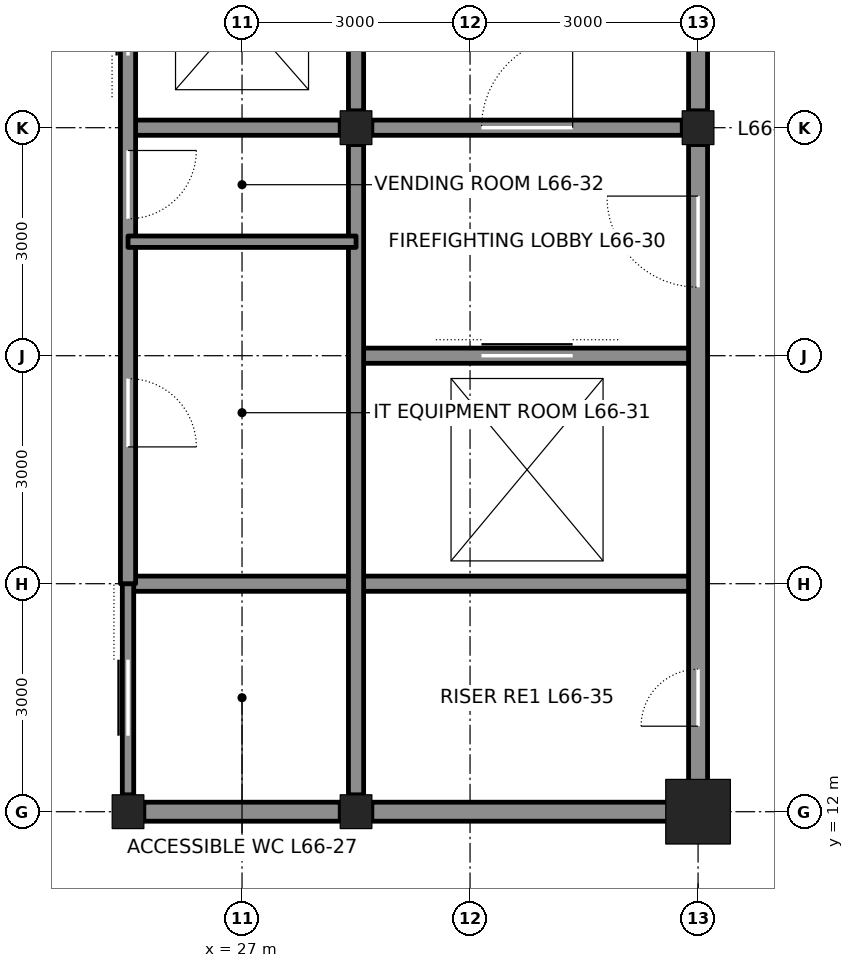
"""IFC4 building model, lengths in metres.
Left out: names, types, materials, properties, quantities, classifications, styles, units other than length and angle.
Written with IfcOpenShell. Run it as: python <this file> out.ifc"""

import sys

from ifc_helpers import new_model, si_unit, direction, frame, frame_2d, origin, origin_2d, place, context, subcontext, project, spatial, rectangle, hollow_rectangle, i_section, extrude, element, fill, save


model = new_model("IFC4")
c1 = context("Model", 3, precision=1e-05, world=origin(), true_north=direction((0.0, 1.0)))
c2 = subcontext(c1, "Body", "Model", "MODEL_VIEW")
j1 = project(units=[si_unit("LENGTHUNIT", "METRE"), si_unit("PLANEANGLEUNIT", "RADIAN")], contexts=[c1])
p1 = place(None, origin())
s1 = spatial("IfcSite", under=j1, at=p1, CompositionType="ELEMENT")
p2 = place(p1, origin())
s2 = spatial("IfcBuilding", under=s1, at=p2, CompositionType="ELEMENT")
p3 = place(p2, frame((0.0, 0.0, 295.8)))
s3 = spatial("IfcBuildingStorey", under=s2, at=p3, CompositionType="ELEMENT", Elevation=295.8)
for number, where, z_axis, x_axis in (
    (1, (25.5, 12.0, 0.0), (0.0, 0.0, 1.0), (1.0, 0.0, 0.0)),
    (2, (28.5, 12.0, 0.0), (0.0, 0.0, 1.0), (1.0, 0.0, 0.0)),
):
    element("IfcColumn", number, at=place(p3, frame(where, z_axis=z_axis, x_axis=x_axis)), inside=s3, PredefinedType="COLUMN", context=c2, shape_type="SweptSolid", body=[
        extrude(i_section(OverallWidth=0.417, OverallDepth=0.445, WebThickness=0.039, FlangeThickness=0.063, at=origin_2d()), origin(), (0.0, 0.0, 1.0), 4.2),
    ])
p4 = place(p3, frame((33.0, 12.0, 0.0), z_axis=(0.0, 0.0, 1.0), x_axis=(1.0, 0.0, 0.0)))
e3 = element("IfcColumn", 3, at=p4, inside=s3, PredefinedType="COLUMN", context=c2, shape_type="SweptSolid", body=[
    extrude(hollow_rectangle(XDim=0.85, YDim=0.85, WallThickness=0.085, at=origin_2d()), origin(), (0.0, 0.0, 1.0), 4.2),
])
for number, where, z_axis, x_axis in (
    (4, (33.0, 21.0, 0.0), (0.0, 0.0, 1.0), (1.0, 0.0, 0.0)),
    (5, (28.5, 21.0, 0.0), (0.0, 0.0, 1.0), (1.0, 0.0, 0.0)),
):
    element("IfcColumn", number, at=place(p3, frame(where, z_axis=z_axis, x_axis=x_axis)), inside=s3, PredefinedType="COLUMN", context=c2, shape_type="SweptSolid", body=[
        extrude(i_section(OverallWidth=0.417, OverallDepth=0.445, WebThickness=0.039, FlangeThickness=0.063, at=origin_2d()), origin(), (0.0, 0.0, 1.0), 4.2),
    ])
p5 = place(p3, frame((25.708, 12.0, 0.0), z_axis=(0.0, 0.0, 1.0), x_axis=(1.0, 0.0, 0.0)))
e6 = element("IfcWall", 6, at=p5, inside=s3, PredefinedType="SOLIDWALL", context=c2, shape_type="SweptSolid", body=[
    extrude(rectangle(XDim=2.583, YDim=0.25, at=frame_2d((1.292, 0.0))), origin(), (0.0, 0.0, 1.0), 3.181),
])
p6 = place(p3, frame((28.708, 12.0, 0.0), z_axis=(0.0, 0.0, 1.0), x_axis=(1.0, 0.0, 0.0)))
e7 = element("IfcWall", 7, at=p6, inside=s3, PredefinedType="SOLIDWALL", context=c2, shape_type="SweptSolid", body=[
    extrude(rectangle(XDim=4.042, YDim=0.25, at=frame_2d((2.021, 0.0))), origin(), (0.0, 0.0, 1.0), 3.181),
])
p7 = place(p3, frame((25.5, 15.0, 0.0), z_axis=(0.0, 0.0, 1.0), x_axis=(1.0, 0.0, 0.0)))
e8 = element("IfcWall", 8, at=p7, inside=s3, PredefinedType="SOLIDWALL", context=c2, shape_type="SweptSolid", body=[
    extrude(rectangle(XDim=7.5, YDim=0.2, at=frame_2d((3.75, 0.0))), origin(), (0.0, 0.0, 1.0), 4.04),
])
p8 = place(p3, frame((28.5, 18.0, 0.0), z_axis=(0.0, 0.0, 1.0), x_axis=(1.0, 0.0, 0.0)))
e9 = element("IfcWall", 9, at=p8, inside=s3, PredefinedType="SOLIDWALL", context=c2, shape_type="SweptSolid", body=[
    extrude(rectangle(XDim=4.5, YDim=0.2, at=frame_2d((2.25, 0.0))), origin(), (0.0, 0.0, 1.0), 4.04),
])
p9 = place(p8, frame((1.65, 0.0, 0.0)))
e10 = element("IfcOpeningElement", 10, at=p9, cuts=e9, PredefinedType="OPENING", context=c2, shape_type="SweptSolid", body=[
    extrude(rectangle(XDim=1.2, YDim=2.1, at=frame_2d((0.6, 1.05))), frame((0.0, 0.11, 0.0), z_axis=(0.0, -1.0, 0.0), x_axis=(1.0, 0.0, 0.0)), (0.0, 0.0, 1.0), 0.22),
])
p10 = place(p3, frame((25.5, 21.0, 0.0), z_axis=(0.0, 0.0, 1.0), x_axis=(1.0, 0.0, 0.0)))
e11 = element("IfcWall", 11, at=p10, inside=s3, PredefinedType="SOLIDWALL", context=c2, shape_type="SweptSolid", body=[
    extrude(rectangle(XDim=2.792, YDim=0.2, at=frame_2d((1.396, 0.0))), origin(), (0.0, 0.0, 1.0), 3.09),
])
p11 = place(p3, frame((28.708, 21.0, 0.0), z_axis=(0.0, 0.0, 1.0), x_axis=(1.0, 0.0, 0.0)))
e12 = element("IfcWall", 12, at=p11, inside=s3, PredefinedType="SOLIDWALL", context=c2, shape_type="SweptSolid", body=[
    extrude(rectangle(XDim=4.083, YDim=0.2, at=frame_2d((2.042, 0.0))), origin(), (0.0, 0.0, 1.0), 3.09),
])
p12 = place(p11, frame((1.442, 0.0, 0.0)))
e13 = element("IfcOpeningElement", 13, at=p12, cuts=e12, PredefinedType="OPENING", context=c2, shape_type="SweptSolid", body=[
    extrude(rectangle(XDim=1.2, YDim=2.1, at=frame_2d((0.6, 1.05))), frame((0.0, 0.11, 0.0), z_axis=(0.0, -1.0, 0.0), x_axis=(1.0, 0.0, 0.0)), (0.0, 0.0, 1.0), 0.22),
])
p13 = place(p3, frame((25.5, 12.222, 0.0), z_axis=(0.0, 0.0, 1.0), x_axis=(0.0, 1.0, 0.0)))
e14 = element("IfcWall", 14, at=p13, inside=s3, PredefinedType="PARTITIONING", context=c2, shape_type="SweptSolid", body=[
    extrude(rectangle(XDim=2.778, YDim=0.15, at=frame_2d((1.389, 0.0))), origin(), (0.0, 0.0, 1.0), 3.064),
])
p14 = place(p13, frame((0.778, 0.0, 0.0)))
e15 = element("IfcOpeningElement", 15, at=p14, cuts=e14, PredefinedType="OPENING", context=c2, shape_type="SweptSolid", body=[
    extrude(rectangle(XDim=1.0, YDim=2.1, at=frame_2d((0.5, 1.05))), frame((0.0, 0.085, 0.0), z_axis=(0.0, -1.0, 0.0), x_axis=(1.0, 0.0, 0.0)), (0.0, 0.0, 1.0), 0.17),
])
p15 = place(p3, frame((25.5, 15.0, 0.0), z_axis=(0.0, 0.0, 1.0), x_axis=(0.0, 1.0, 0.0)))
e16 = element("IfcWall", 16, at=p15, inside=s3, PredefinedType="SOLIDWALL", context=c2, shape_type="SweptSolid", body=[
    extrude(rectangle(XDim=12.0, YDim=0.2, at=frame_2d((6.0, 0.0))), origin(), (0.0, 0.0, 1.0), 3.064),
])
p16 = place(p15, frame((1.8, 0.0, 0.0)))
e17 = element("IfcOpeningElement", 17, at=p16, cuts=e16, PredefinedType="OPENING", context=c2, shape_type="SweptSolid", body=[
    extrude(rectangle(XDim=0.9, YDim=2.1, at=frame_2d((0.45, 1.05))), frame((0.0, 0.11, 0.0), z_axis=(0.0, -1.0, 0.0), x_axis=(1.0, 0.0, 0.0)), (0.0, 0.0, 1.0), 0.22),
])
p17 = place(p15, frame((4.8, 0.0, 0.0)))
e18 = element("IfcOpeningElement", 18, at=p17, cuts=e16, PredefinedType="OPENING", context=c2, shape_type="SweptSolid", body=[
    extrude(rectangle(XDim=0.9, YDim=2.1, at=frame_2d((0.45, 1.05))), frame((0.0, 0.11, 0.0), z_axis=(0.0, -1.0, 0.0), x_axis=(1.0, 0.0, 0.0)), (0.0, 0.0, 1.0), 0.22),
])
p18 = place(p15, frame((6.95, 0.0, 0.0)))
e19 = element("IfcOpeningElement", 19, at=p18, cuts=e16, PredefinedType="OPENING", context=c2, shape_type="SweptSolid", body=[
    extrude(rectangle(XDim=1.1, YDim=2.1, at=frame_2d((0.55, 1.05))), frame((0.0, 0.11, 0.0), z_axis=(0.0, -1.0, 0.0), x_axis=(1.0, 0.0, 0.0)), (0.0, 0.0, 1.0), 0.22),
])
p19 = place(p15, frame((9.95, 0.0, 0.0)))
e20 = element("IfcOpeningElement", 20, at=p19, cuts=e16, PredefinedType="OPENING", context=c2, shape_type="SweptSolid", body=[
    extrude(rectangle(XDim=1.1, YDim=2.1, at=frame_2d((0.55, 1.05))), frame((0.0, 0.11, 0.0), z_axis=(0.0, -1.0, 0.0), x_axis=(1.0, 0.0, 0.0)), (0.0, 0.0, 1.0), 0.22),
])
p20 = place(p3, frame((28.5, 12.222, 0.0), z_axis=(0.0, 0.0, 1.0), x_axis=(0.0, 1.0, 0.0)))
e21 = element("IfcWall", 21, at=p20, inside=s3, PredefinedType="SOLIDWALL", context=c2, shape_type="SweptSolid", body=[
    extrude(rectangle(XDim=8.555, YDim=0.2, at=frame_2d((4.278, 0.0))), origin(), (0.0, 0.0, 1.0), 3.113),
])
p21 = place(p3, frame((28.5, 21.222, 0.0), z_axis=(0.0, 0.0, 1.0), x_axis=(0.0, 1.0, 0.0)))
e22 = element("IfcWall", 22, at=p21, inside=s3, PredefinedType="SOLIDWALL", context=c2, shape_type="SweptSolid", body=[
    extrude(rectangle(XDim=2.555, YDim=0.2, at=frame_2d((1.278, 0.0))), origin(), (0.0, 0.0, 1.0), 3.113),
])
p22 = place(p3, frame((33.0, 12.25, 0.0), z_axis=(0.0, 0.0, 1.0), x_axis=(0.0, 1.0, 0.0)))
e23 = element("IfcWall", 23, at=p22, inside=s3, PredefinedType="SOLIDWALL", context=c2, shape_type="SweptSolid", body=[
    extrude(rectangle(XDim=8.528, YDim=0.25, at=frame_2d((4.264, 0.0))), origin(), (0.0, 0.0, 1.0), 3.113),
])
p23 = place(p22, frame((6.65, 0.0, 0.0)))
e24 = element("IfcOpeningElement", 24, at=p23, cuts=e23, PredefinedType="OPENING", context=c2, shape_type="SweptSolid", body=[
    extrude(rectangle(XDim=1.2, YDim=2.1, at=frame_2d((0.6, 1.05))), frame((0.0, 0.135, 0.0), z_axis=(0.0, -1.0, 0.0), x_axis=(1.0, 0.0, 0.0)), (0.0, 0.0, 1.0), 0.27),
])
p24 = place(p22, frame((0.875, 0.0, 0.0)))
e25 = element("IfcOpeningElement", 25, at=p24, cuts=e23, PredefinedType="OPENING", context=c2, shape_type="SweptSolid", body=[
    extrude(rectangle(XDim=0.75, YDim=2.1, at=frame_2d((0.375, 1.05))), frame((0.0, 0.135, 0.0), z_axis=(0.0, -1.0, 0.0), x_axis=(1.0, 0.0, 0.0)), (0.0, 0.0, 1.0), 0.27),
])
p25 = place(p3, frame((33.0, 21.222, 0.0), z_axis=(0.0, 0.0, 1.0), x_axis=(0.0, 1.0, 0.0)))
e26 = element("IfcWall", 26, at=p25, inside=s3, PredefinedType="SOLIDWALL", context=c2, shape_type="SweptSolid", body=[
    extrude(rectangle(XDim=2.555, YDim=0.25, at=frame_2d((1.278, 0.0))), origin(), (0.0, 0.0, 1.0), 3.113),
])
p26 = place(p3, frame((25.5, 19.5, 0.0), z_axis=(0.0, 0.0, 1.0), x_axis=(1.0, 0.0, 0.0)))
e27 = element("IfcWall", 27, at=p26, inside=s3, PredefinedType="PARTITIONING", context=c2, shape_type="SweptSolid", body=[
    extrude(rectangle(XDim=3.0, YDim=0.15, at=frame_2d((1.5, 0.0))), origin(), (0.0, 0.0, 1.0), 4.04),
])
p27 = place(p12, origin())
e28 = element("IfcDoor", 28, at=p27, inside=s3, OperationType="SINGLE_SWING_RIGHT", PredefinedType="DOOR", context=c2, shape_type="SweptSolid", body=[
    extrude(rectangle(XDim=1.2, YDim=2.1, at=frame_2d((0.6, 1.05))), frame((0.0, 0.025, 0.0), z_axis=(0.0, -1.0, 0.0), x_axis=(1.0, 0.0, 0.0)), (0.0, 0.0, 1.0), 0.05),
])
fill(e13, e28)
p28 = place(p23, origin())
e29 = element("IfcDoor", 29, at=p28, inside=s3, OperationType="SINGLE_SWING_RIGHT", PredefinedType="DOOR", context=c2, shape_type="SweptSolid", body=[
    extrude(rectangle(XDim=1.2, YDim=2.1, at=frame_2d((0.6, 1.05))), frame((0.0, 0.025, 0.0), z_axis=(0.0, -1.0, 0.0), x_axis=(1.0, 0.0, 0.0)), (0.0, 0.0, 1.0), 0.05),
])
fill(e24, e29)
p29 = place(p9, origin())
e30 = element("IfcDoor", 30, at=p29, inside=s3, OperationType="DOUBLE_DOOR_SLIDING", PredefinedType="DOOR", context=c2, shape_type="SweptSolid", body=[
    extrude(rectangle(XDim=1.2, YDim=2.1, at=frame_2d((0.6, 1.05))), frame((0.0, 0.025, 0.0), z_axis=(0.0, -1.0, 0.0), x_axis=(1.0, 0.0, 0.0)), (0.0, 0.0, 1.0), 0.05),
])
fill(e10, e30)
p30 = place(p24, origin())
e31 = element("IfcDoor", 31, at=p30, inside=s3, OperationType="SINGLE_SWING_LEFT", PredefinedType="DOOR", context=c2, shape_type="SweptSolid", body=[
    extrude(rectangle(XDim=0.75, YDim=2.1, at=frame_2d((0.375, 1.05))), frame((0.0, 0.025, 0.0), z_axis=(0.0, -1.0, 0.0), x_axis=(1.0, 0.0, 0.0)), (0.0, 0.0, 1.0), 0.05),
])
fill(e25, e31)
p31 = place(p14, origin())
e32 = element("IfcDoor", 32, at=p31, inside=s3, OperationType="SLIDING_TO_LEFT", PredefinedType="DOOR", context=c2, shape_type="SweptSolid", body=[
    extrude(rectangle(XDim=1.0, YDim=2.1, at=frame_2d((0.5, 1.05))), frame((0.0, 0.025, 0.0), z_axis=(0.0, -1.0, 0.0), x_axis=(1.0, 0.0, 0.0)), (0.0, 0.0, 1.0), 0.05),
])
fill(e15, e32)
p32 = place(p16, frame((0.9, 0.0, 0.0), z_axis=(0.0, 0.0, 1.0), x_axis=(-1.0, 0.0, 0.0)))
e33 = element("IfcDoor", 33, at=p32, inside=s3, OperationType="SINGLE_SWING_RIGHT", PredefinedType="DOOR", context=c2, shape_type="SweptSolid", body=[
    extrude(rectangle(XDim=0.9, YDim=2.1, at=frame_2d((0.45, 1.05))), frame((0.0, 0.025, 0.0), z_axis=(0.0, -1.0, 0.0), x_axis=(1.0, 0.0, 0.0)), (0.0, 0.0, 1.0), 0.05),
])
fill(e17, e33)
p33 = place(p17, frame((0.9, 0.0, 0.0), z_axis=(0.0, 0.0, 1.0), x_axis=(-1.0, 0.0, 0.0)))
e34 = element("IfcDoor", 34, at=p33, inside=s3, OperationType="SINGLE_SWING_LEFT", PredefinedType="DOOR", context=c2, shape_type="SweptSolid", body=[
    extrude(rectangle(XDim=0.9, YDim=2.1, at=frame_2d((0.45, 1.05))), frame((0.0, 0.025, 0.0), z_axis=(0.0, -1.0, 0.0), x_axis=(1.0, 0.0, 0.0)), (0.0, 0.0, 1.0), 0.05),
])
fill(e18, e34)
p34 = place(p18, origin())
e35 = element("IfcDoor", 35, at=p34, inside=s3, OperationType="DOUBLE_DOOR_SLIDING", PredefinedType="DOOR", context=c2, shape_type="SweptSolid", body=[
    extrude(rectangle(XDim=1.1, YDim=2.1, at=frame_2d((0.55, 1.05))), frame((0.0, 0.025, 0.0), z_axis=(0.0, -1.0, 0.0), x_axis=(1.0, 0.0, 0.0)), (0.0, 0.0, 1.0), 0.05),
])
fill(e19, e35)
save(model, sys.argv[1])
